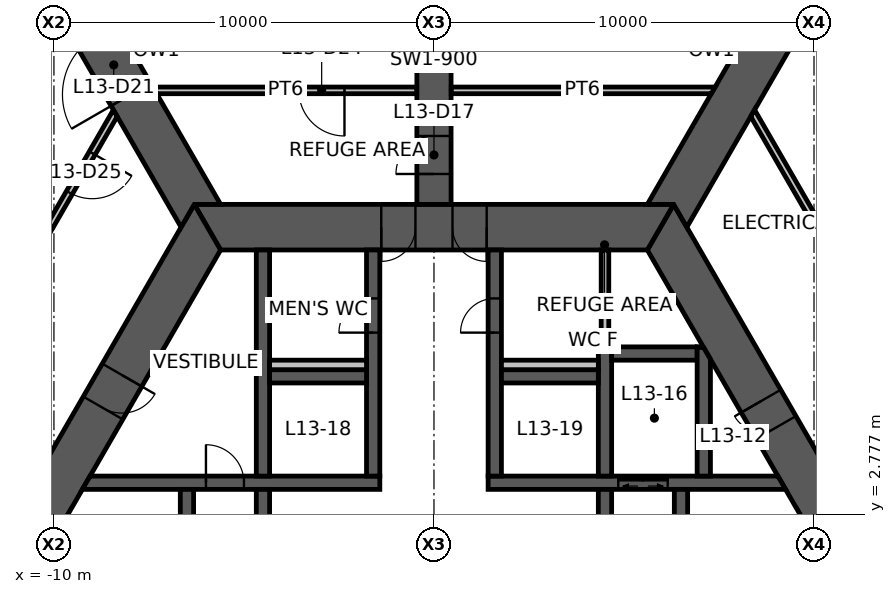
"""IFC4 building model, lengths in metres.
Left out: names, types, materials, properties, quantities, classifications, styles, units other than length and angle.
Written with IfcOpenShell. Run it as: python <this file> out.ifc"""

import sys

from ifc_helpers import new_model, si_unit, direction, frame, frame_2d, origin, place, context, subcontext, project, spatial, polyline, rectangle, outline, extrude, element, fill, save


model = new_model("IFC4")
c1 = context("Model", 3, precision=1e-05, world=origin(), true_north=direction((0.0, 1.0)))
c2 = subcontext(c1, "Body", "Model", "MODEL_VIEW")
j1 = project(units=[si_unit("LENGTHUNIT", "METRE"), si_unit("PLANEANGLEUNIT", "RADIAN")], contexts=[c1])
p1 = place(None, origin())
s1 = spatial("IfcSite", under=j1, at=p1, CompositionType="ELEMENT")
p2 = place(p1, origin())
s2 = spatial("IfcBuilding", under=s1, at=p2, CompositionType="ELEMENT")
p3 = place(p2, frame((0.0, 0.0, 52.0)))
s3 = spatial("IfcBuildingStorey", under=s2, at=p3, CompositionType="ELEMENT", Elevation=52.0)
p4 = place(p3, frame((11.922, 0.0, 0.0), z_axis=(0.0, 0.0, 1.0), x_axis=(-0.500004296715, 0.866022923061, 0.0)))
e1 = element("IfcWall", 1, at=p4, inside=s3, PredefinedType="SHEAR", context=c2, shape_type="SweptSolid", body=[
    extrude(outline(polyline([(-0.346, -0.6), (5.835, -0.6), (6.635, -0.6), (12.269, -0.6), (11.576, 0.6), (6.635, 0.6), (5.835, 0.6), (0.346, 0.6), (-0.346, -0.6)])), origin(), (0.0, 0.0, 1.0), 5.0),
])
p5 = place(p4, frame((5.835, 0.0, 0.0)))
e2 = element("IfcOpeningElement", 2, at=p5, cuts=e1, PredefinedType="OPENING", context=c2, shape_type="SweptSolid", body=[
    extrude(rectangle(XDim=0.8, YDim=2.1, at=frame_2d((0.4, 1.05))), frame((0.0, 0.61, 0.0), z_axis=(0.0, -1.0, 0.0), x_axis=(1.0, 0.0, 0.0)), (0.0, 0.0, 1.0), 1.22),
])
p6 = place(p3, frame((5.961, 10.325, 0.0), z_axis=(0.0, 0.0, 1.0), x_axis=(-1.0, 0.0, 0.0)))
e3 = element("IfcWall", 3, at=p6, inside=s3, PredefinedType="SHEAR", context=c2, shape_type="SweptSolid", body=[
    extrude(outline(polyline([(-0.346, -0.6), (4.574, -0.6), (5.474, -0.6), (6.449, -0.6), (7.349, -0.6), (12.269, -0.6), (11.576, 0.6), (7.349, 0.6), (6.449, 0.6), (5.474, 0.6), (4.574, 0.6), (0.346, 0.6), (-0.346, -0.6)])), origin(), (0.0, 0.0, 1.0), 5.0),
])
p7 = place(p6, frame((6.449, 0.0, 0.0)))
e4 = element("IfcOpeningElement", 4, at=p7, cuts=e3, PredefinedType="OPENING", context=c2, shape_type="SweptSolid", body=[
    extrude(rectangle(XDim=0.9, YDim=2.1, at=frame_2d((0.45, 1.05))), frame((0.0, 0.61, 0.0), z_axis=(0.0, -1.0, 0.0), x_axis=(1.0, 0.0, 0.0)), (0.0, 0.0, 1.0), 1.22),
])
p8 = place(p6, frame((4.574, 0.0, 0.0)))
e5 = element("IfcOpeningElement", 5, at=p8, cuts=e3, PredefinedType="OPENING", context=c2, shape_type="SweptSolid", body=[
    extrude(rectangle(XDim=0.9, YDim=2.1, at=frame_2d((0.45, 1.05))), frame((0.0, 0.61, 0.0), z_axis=(0.0, -1.0, 0.0), x_axis=(1.0, 0.0, 0.0)), (0.0, 0.0, 1.0), 1.22),
])
p9 = place(p3, frame((-5.961, 10.325, 0.0), z_axis=(0.0, 0.0, 1.0), x_axis=(-0.500004296715, -0.866022923061, 0.0)))
e6 = element("IfcWall", 6, at=p9, inside=s3, PredefinedType="SHEAR", context=c2, shape_type="SweptSolid", body=[
    extrude(outline(polyline([(-0.346, -0.6), (4.494, -0.6), (5.494, -0.6), (12.269, -0.6), (11.576, 0.6), (5.494, 0.6), (4.494, 0.6), (0.346, 0.6), (-0.346, -0.6)])), origin(), (0.0, 0.0, 1.0), 5.0),
])
p10 = place(p9, frame((4.494, 0.0, 0.0)))
e7 = element("IfcOpeningElement", 7, at=p10, cuts=e6, PredefinedType="OPENING", context=c2, shape_type="SweptSolid", body=[
    extrude(rectangle(XDim=1.0, YDim=2.1, at=frame_2d((0.5, 1.05))), frame((0.0, 0.61, 0.0), z_axis=(0.0, -1.0, 0.0), x_axis=(1.0, 0.0, 0.0)), (0.0, 0.0, 1.0), 1.22),
])
p11 = place(p3, frame((0.0, 10.925, 0.0), z_axis=(0.0, 0.0, 1.0), x_axis=(0.0, 1.0, 0.0)))
e8 = element("IfcWall", 8, at=p11, inside=s3, PredefinedType="SHEAR", context=c2, shape_type="SweptSolid", body=[
    extrude(rectangle(XDim=7.595, YDim=0.9, at=frame_2d((3.798, 0.0))), origin(), (0.0, 0.0, 1.0), 5.0),
])
p12 = place(p11, frame((0.8, 0.0, 0.0)))
e9 = element("IfcOpeningElement", 9, at=p12, cuts=e8, PredefinedType="OPENING", context=c2, shape_type="SweptSolid", body=[
    extrude(rectangle(XDim=1.0, YDim=2.1, at=frame_2d((0.5, 1.05))), frame((0.0, 0.46, 0.0), z_axis=(0.0, -1.0, 0.0), x_axis=(1.0, 0.0, 0.0)), (0.0, 0.0, 1.0), 0.92),
])
p13 = place(p3, frame((6.308, 10.925, -1.15), z_axis=(0.0, 0.0, 1.0), x_axis=(0.499993363642, 0.866029235253, 0.0)))
e10 = element("IfcWall", 10, at=p13, inside=s3, PredefinedType="SHEAR", context=c2, shape_type="SweptSolid", body=[
    extrude(outline(polyline([(-0.346, -0.6), (7.385, -0.6), (7.385, 0.6), (-0.346, 0.6), (0.0, 0.0), (-0.346, -0.6)])), origin(), (0.0, 0.0, 1.0), 6.15),
])
p14 = place(p3, frame((-6.308, 10.925, -1.15), z_axis=(0.0, 0.0, 1.0), x_axis=(-0.499993363642, 0.866029235253, 0.0)))
e11 = element("IfcWall", 11, at=p14, inside=s3, PredefinedType="SHEAR", context=c2, shape_type="SweptSolid", body=[
    extrude(outline(polyline([(-0.346, -0.6), (3.338, -0.6), (5.138, -0.6), (7.385, -0.6), (7.385, 0.6), (5.138, 0.6), (3.338, 0.6), (-0.346, 0.6), (0.0, 0.0), (-0.346, -0.6)])), origin(), (0.0, 0.0, 1.0), 6.15),
])
p15 = place(p14, frame((3.338, 0.0, 1.15)))
e12 = element("IfcOpeningElement", 12, at=p15, cuts=e11, PredefinedType="OPENING", context=c2, shape_type="SweptSolid", body=[
    extrude(rectangle(XDim=1.8, YDim=2.4, at=frame_2d((0.9, 1.2))), frame((0.0, 0.61, 0.0), z_axis=(0.0, -1.0, 0.0), x_axis=(1.0, 0.0, 0.0)), (0.0, 0.0, 1.0), 1.22),
])
p16 = place(p3, frame((-9.151, 3.6, 0.0), z_axis=(0.0, 0.0, 1.0), x_axis=(1.0, 0.0, 0.0)))
e13 = element("IfcWall", 13, at=p16, inside=s3, PredefinedType="SHEAR", context=c2, shape_type="SweptSolid", body=[
    extrude(outline(polyline([(-0.101, -0.175), (3.151, -0.175), (4.151, -0.175), (7.726, -0.175), (7.726, 0.175), (4.151, 0.175), (3.151, 0.175), (0.101, 0.175), (-0.101, -0.175)])), origin(), (0.0, 0.0, 1.0), 5.0),
])
p17 = place(p16, frame((3.151, 0.0, 0.0)))
e14 = element("IfcOpeningElement", 14, at=p17, cuts=e13, PredefinedType="OPENING", context=c2, shape_type="SweptSolid", body=[
    extrude(rectangle(XDim=1.0, YDim=2.1, at=frame_2d((0.5, 1.05))), frame((0.0, 0.185, 0.0), z_axis=(0.0, -1.0, 0.0), x_axis=(1.0, 0.0, 0.0)), (0.0, 0.0, 1.0), 0.37),
])
p18 = place(p3, frame((1.425, 3.6, 0.0), z_axis=(0.0, 0.0, 1.0), x_axis=(1.0, 0.0, 0.0)))
e15 = element("IfcWall", 15, at=p18, inside=s3, PredefinedType="SHEAR", context=c2, shape_type="SweptSolid", body=[
    extrude(outline(polyline([(0.0, -0.175), (3.425, -0.175), (4.725, -0.175), (7.827, -0.175), (7.625, 0.175), (4.725, 0.175), (3.425, 0.175), (0.0, 0.175), (0.0, -0.175)])), origin(), (0.0, 0.0, 1.0), 5.0),
])
p19 = place(p18, frame((3.425, 0.0, 0.0)))
e16 = element("IfcOpeningElement", 16, at=p19, cuts=e15, PredefinedType="OPENING", context=c2, shape_type="SweptSolid", body=[
    extrude(rectangle(XDim=1.3, YDim=2.1, at=frame_2d((0.65, 1.05))), frame((0.0, 0.185, 0.0), z_axis=(0.0, -1.0, 0.0), x_axis=(1.0, 0.0, 0.0)), (0.0, 0.0, 1.0), 0.37),
])
p20 = place(p3, frame((-1.6, 3.775, 0.0), z_axis=(0.0, 0.0, 1.0), x_axis=(0.0, 1.0, 0.0)))
e17 = element("IfcWall", 17, at=p20, inside=s3, PredefinedType="SHEAR", context=c2, shape_type="SweptSolid", body=[
    extrude(rectangle(XDim=5.95, YDim=0.35, at=frame_2d((2.975, 0.0))), origin(), (0.0, 0.0, 1.0), 5.0),
])
p21 = place(p20, frame((3.775, 0.0, 0.0)))
e18 = element("IfcOpeningElement", 18, at=p21, cuts=e17, PredefinedType="OPENING", context=c2, shape_type="SweptSolid", body=[
    extrude(rectangle(XDim=0.9, YDim=2.1, at=frame_2d((0.45, 1.05))), frame((0.0, 0.185, 0.0), z_axis=(0.0, -1.0, 0.0), x_axis=(1.0, 0.0, 0.0)), (0.0, 0.0, 1.0), 0.37),
])
p22 = place(p3, frame((1.6, 3.775, 0.0), z_axis=(0.0, 0.0, 1.0), x_axis=(0.0, 1.0, 0.0)))
e19 = element("IfcWall", 19, at=p22, inside=s3, PredefinedType="SHEAR", context=c2, shape_type="SweptSolid", body=[
    extrude(rectangle(XDim=5.95, YDim=0.35, at=frame_2d((2.975, 0.0))), origin(), (0.0, 0.0, 1.0), 5.0),
])
p23 = place(p22, frame((3.775, 0.0, 0.0)))
e20 = element("IfcOpeningElement", 20, at=p23, cuts=e19, PredefinedType="OPENING", context=c2, shape_type="SweptSolid", body=[
    extrude(rectangle(XDim=0.9, YDim=2.1, at=frame_2d((0.45, 1.05))), frame((0.0, 0.185, 0.0), z_axis=(0.0, -1.0, 0.0), x_axis=(1.0, 0.0, 0.0)), (0.0, 0.0, 1.0), 0.37),
])
p24 = place(p3, frame((-4.5, -3.425, 0.0), z_axis=(0.0, 0.0, 1.0), x_axis=(0.0, 1.0, 0.0)))
e21 = element("IfcWall", 21, at=p24, inside=s3, PredefinedType="SHEAR", context=c2, shape_type="SweptSolid", body=[
    extrude(rectangle(XDim=6.85, YDim=0.35, at=frame_2d((3.425, 0.0))), origin(), (0.0, 0.0, 1.0), 5.0),
])
p25 = place(p24, frame((2.925, 0.0, 0.0)))
e22 = element("IfcOpeningElement", 22, at=p25, cuts=e21, PredefinedType="OPENING", context=c2, shape_type="SweptSolid", body=[
    extrude(rectangle(XDim=1.0, YDim=2.1, at=frame_2d((0.5, 1.05))), frame((0.0, 0.185, 0.0), z_axis=(0.0, -1.0, 0.0), x_axis=(1.0, 0.0, 0.0)), (0.0, 0.0, 1.0), 0.37),
])
p26 = place(p3, frame((4.5, -3.425, 0.0), z_axis=(0.0, 0.0, 1.0), x_axis=(0.0, 1.0, 0.0)))
e23 = element("IfcWall", 23, at=p26, inside=s3, PredefinedType="SHEAR", context=c2, shape_type="SweptSolid", body=[
    extrude(rectangle(XDim=6.85, YDim=0.35, at=frame_2d((3.425, 0.0))), origin(), (0.0, 0.0, 1.0), 5.0),
])
p27 = place(p26, frame((2.925, 0.0, 0.0)))
e24 = element("IfcOpeningElement", 24, at=p27, cuts=e23, PredefinedType="OPENING", context=c2, shape_type="SweptSolid", body=[
    extrude(rectangle(XDim=1.0, YDim=2.1, at=frame_2d((0.5, 1.05))), frame((0.0, 0.185, 0.0), z_axis=(0.0, -1.0, 0.0), x_axis=(1.0, 0.0, 0.0)), (0.0, 0.0, 1.0), 0.37),
])
p28 = place(p3, frame((-6.5, -3.425, 0.0), z_axis=(0.0, 0.0, 1.0), x_axis=(0.0, 1.0, 0.0)))
e25 = element("IfcWall", 25, at=p28, inside=s3, PredefinedType="SHEAR", context=c2, shape_type="SweptSolid", body=[
    extrude(rectangle(XDim=6.85, YDim=0.35, at=frame_2d((3.425, 0.0))), origin(), (0.0, 0.0, 1.0), 5.0),
])
p29 = place(p28, frame((0.1, 0.0, 0.0)))
e26 = element("IfcOpeningElement", 26, at=p29, cuts=e25, PredefinedType="OPENING", context=c2, shape_type="SweptSolid", body=[
    extrude(rectangle(XDim=1.0, YDim=2.1, at=frame_2d((0.5, 1.05))), frame((0.0, 0.185, 0.0), z_axis=(0.0, -1.0, 0.0), x_axis=(1.0, 0.0, 0.0)), (0.0, 0.0, 1.0), 0.37),
])
p30 = place(p3, frame((6.5, -3.425, 0.0), z_axis=(0.0, 0.0, 1.0), x_axis=(0.0, 1.0, 0.0)))
e27 = element("IfcWall", 27, at=p30, inside=s3, PredefinedType="SHEAR", context=c2, shape_type="SweptSolid", body=[
    extrude(rectangle(XDim=6.85, YDim=0.35, at=frame_2d((3.425, 0.0))), origin(), (0.0, 0.0, 1.0), 5.0),
])
p31 = place(p30, frame((0.1, 0.0, 0.0)))
e28 = element("IfcOpeningElement", 28, at=p31, cuts=e27, PredefinedType="OPENING", context=c2, shape_type="SweptSolid", body=[
    extrude(rectangle(XDim=1.0, YDim=2.1, at=frame_2d((0.5, 1.05))), frame((0.0, 0.185, 0.0), z_axis=(0.0, -1.0, 0.0), x_axis=(1.0, 0.0, 0.0)), (0.0, 0.0, 1.0), 0.37),
])
p32 = place(p3, frame((-4.5, 3.775, 0.0), z_axis=(0.0, 0.0, 1.0), x_axis=(0.0, 1.0, 0.0)))
e29 = element("IfcWall", 29, at=p32, inside=s3, PredefinedType="SHEAR", context=c2, shape_type="SweptSolid", body=[
    extrude(rectangle(XDim=5.95, YDim=0.35, at=frame_2d((2.975, 0.0))), origin(), (0.0, 0.0, 1.0), 5.0),
])
p33 = place(p3, frame((4.5, 3.775, 0.0), z_axis=(0.0, 0.0, 1.0), x_axis=(0.0, 1.0, 0.0)))
e30 = element("IfcWall", 30, at=p33, inside=s3, PredefinedType="SHEAR", context=c2, shape_type="SweptSolid", body=[
    extrude(rectangle(XDim=3.4, YDim=0.35, at=frame_2d((1.7, 0.0))), origin(), (0.0, 0.0, 1.0), 5.0),
])
for number, where, z_axis, x_axis in (
    (31, (-4.325, 6.4, 0.0), (0.0, 0.0, 1.0), (1.0, 0.0, 0.0)),
    (32, (1.775, 6.4, 0.0), (0.0, 0.0, 1.0), (1.0, 0.0, 0.0)),
):
    element("IfcWall", number, at=place(p3, frame(where, z_axis=z_axis, x_axis=x_axis)), inside=s3, PredefinedType="SHEAR", context=c2, shape_type="SweptSolid", body=[
        extrude(rectangle(XDim=2.55, YDim=0.35, at=frame_2d((1.275, 0.0))), origin(), (0.0, 0.0, 1.0), 5.0),
    ])
p34 = place(p3, frame((4.675, 7.0, 0.0), z_axis=(0.0, 0.0, 1.0), x_axis=(1.0, 0.0, 0.0)))
e33 = element("IfcWall", 33, at=p34, inside=s3, PredefinedType="SHEAR", context=c2, shape_type="SweptSolid", body=[
    extrude(rectangle(XDim=2.25, YDim=0.35, at=frame_2d((1.125, 0.0))), origin(), (0.0, 0.0, 1.0), 5.0),
])
p35 = place(p3, frame((7.1, 3.775, 0.0), z_axis=(0.0, 0.0, 1.0), x_axis=(0.0, 1.0, 0.0)))
e34 = element("IfcWall", 34, at=p35, inside=s3, PredefinedType="SHEAR", context=c2, shape_type="SweptSolid", body=[
    extrude(outline(polyline([(0.0, -0.175), (3.074, -0.175), (3.377, 0.0), (3.4, 0.175), (0.0, 0.175), (0.0, -0.175)])), origin(), (0.0, 0.0, 1.0), 5.0),
])
p36 = place(p3, frame((4.5, 7.175, 0.0), z_axis=(0.0, 0.0, 1.0), x_axis=(0.0, 1.0, 0.0)))
e35 = element("IfcWall", 35, at=p36, inside=s3, PredefinedType="STANDARD", context=c2, shape_type="SweptSolid", body=[
    extrude(rectangle(XDim=2.55, YDim=0.2, at=frame_2d((1.275, 0.0))), origin(), (0.0, 0.0, 1.0), 5.0),
])
for number, where, z_axis, x_axis in (
    (36, (-4.325, 6.7, 0.0), (0.0, 0.0, 1.0), (1.0, 0.0, 0.0)),
    (37, (1.775, 6.7, 0.0), (0.0, 0.0, 1.0), (1.0, 0.0, 0.0)),
):
    element("IfcWall", number, at=place(p3, frame(where, z_axis=z_axis, x_axis=x_axis)), inside=s3, PredefinedType="PLUMBINGWALL", context=c2, shape_type="SweptSolid", body=[
        extrude(rectangle(XDim=2.55, YDim=0.25, at=frame_2d((1.275, 0.0))), origin(), (0.0, 0.0, 1.0), 5.0),
    ])
p37 = place(p3, frame((15.733, 0.6, 0.0), z_axis=(0.0, 0.0, 1.0), x_axis=(-0.49999908555, 0.866025931742, 0.0)))
e38 = element("IfcWall", 38, at=p37, inside=s3, PredefinedType="PARTITIONING", context=c2, shape_type="SweptSolid", body=[
    extrude(outline(polyline([(-0.051, -0.087), (1.213, -0.087), (2.413, -0.087), (14.744, -0.087), (14.643, 0.087), (2.413, 0.087), (1.213, 0.087), (0.051, 0.087), (-0.051, -0.087)])), origin(), (0.0, 0.0, 1.0), 4.83),
])
p38 = place(p37, frame((1.213, 0.0, 0.0)))
e39 = element("IfcOpeningElement", 39, at=p38, cuts=e38, PredefinedType="OPENING", context=c2, shape_type="SweptSolid", body=[
    extrude(rectangle(XDim=1.2, YDim=2.1, at=frame_2d((0.6, 1.05))), frame((0.0, 0.098, 0.0), z_axis=(0.0, -1.0, 0.0), x_axis=(1.0, 0.0, 0.0)), (0.0, 0.0, 1.0), 0.195),
])
p39 = place(p3, frame((7.347, 13.925, 0.0), z_axis=(0.0, 0.0, 1.0), x_axis=(-1.0, 0.0, 0.0)))
e40 = element("IfcWall", 40, at=p39, inside=s3, PredefinedType="PARTITIONING", context=c2, shape_type="SweptSolid", body=[
    extrude(outline(polyline([(-0.051, -0.087), (6.892, -0.087), (6.892, 0.087), (0.051, 0.087), (-0.051, -0.087)])), origin(), (0.0, 0.0, 1.0), 4.83),
])
p40 = place(p3, frame((-0.455, 13.925, 0.0), z_axis=(0.0, 0.0, 1.0), x_axis=(-1.0, 0.0, 0.0)))
e41 = element("IfcWall", 41, at=p40, inside=s3, PredefinedType="PARTITIONING", context=c2, shape_type="SweptSolid", body=[
    extrude(outline(polyline([(0.0, -0.087), (1.9, -0.087), (3.1, -0.087), (6.942, -0.087), (6.841, 0.087), (3.1, 0.087), (1.9, 0.087), (0.0, 0.087), (0.0, -0.087)])), origin(), (0.0, 0.0, 1.0), 4.83),
])
p41 = place(p40, frame((1.9, 0.0, 0.0)))
e42 = element("IfcOpeningElement", 42, at=p41, cuts=e41, PredefinedType="OPENING", context=c2, shape_type="SweptSolid", body=[
    extrude(rectangle(XDim=1.2, YDim=2.1, at=frame_2d((0.6, 1.05))), frame((0.0, 0.098, 0.0), z_axis=(0.0, -1.0, 0.0), x_axis=(1.0, 0.0, 0.0)), (0.0, 0.0, 1.0), 0.195),
])
p42 = place(p3, frame((-8.386, 13.325, 0.0), z_axis=(0.0, 0.0, 1.0), x_axis=(-0.500011547171, -0.866018736919, 0.0)))
e43 = element("IfcWall", 43, at=p42, inside=s3, PredefinedType="PARTITIONING", context=c2, shape_type="SweptSolid", body=[
    extrude(outline(polyline([(-0.051, -0.087), (1.213, -0.087), (2.413, -0.087), (14.744, -0.087), (14.643, 0.087), (2.413, 0.087), (1.213, 0.087), (0.051, 0.087), (-0.051, -0.087)])), origin(), (0.0, 0.0, 1.0), 4.83),
])
p43 = place(p42, frame((1.213, 0.0, 0.0)))
e44 = element("IfcOpeningElement", 44, at=p43, cuts=e43, PredefinedType="OPENING", context=c2, shape_type="SweptSolid", body=[
    extrude(rectangle(XDim=1.2, YDim=2.1, at=frame_2d((0.6, 1.05))), frame((0.0, 0.098, 0.0), z_axis=(0.0, -1.0, 0.0), x_axis=(1.0, 0.0, 0.0)), (0.0, 0.0, 1.0), 0.195),
])
p44 = place(p7, origin())
e45 = element("IfcDoor", 45, at=p44, inside=s3, OperationType="SINGLE_SWING_RIGHT", PredefinedType="DOOR", context=c2, shape_type="SweptSolid", body=[
    extrude(rectangle(XDim=0.9, YDim=2.1, at=frame_2d((0.45, 1.05))), frame((0.0, 0.025, 0.0), z_axis=(0.0, -1.0, 0.0), x_axis=(1.0, 0.0, 0.0)), (0.0, 0.0, 1.0), 0.05),
])
fill(e4, e45)
p45 = place(p8, origin())
e46 = element("IfcDoor", 46, at=p45, inside=s3, OperationType="SINGLE_SWING_LEFT", PredefinedType="DOOR", context=c2, shape_type="SweptSolid", body=[
    extrude(rectangle(XDim=0.9, YDim=2.1, at=frame_2d((0.45, 1.05))), frame((0.0, 0.025, 0.0), z_axis=(0.0, -1.0, 0.0), x_axis=(1.0, 0.0, 0.0)), (0.0, 0.0, 1.0), 0.05),
])
fill(e5, e46)
p46 = place(p5, origin())
e47 = element("IfcDoor", 47, at=p46, inside=s3, OperationType="SINGLE_SWING_RIGHT", PredefinedType="DOOR", context=c2, shape_type="SweptSolid", body=[
    extrude(rectangle(XDim=0.8, YDim=2.1, at=frame_2d((0.4, 1.05))), frame((0.0, 0.025, 0.0), z_axis=(0.0, -1.0, 0.0), x_axis=(1.0, 0.0, 0.0)), (0.0, 0.0, 1.0), 0.05),
])
fill(e2, e47)
p47 = place(p10, origin())
e48 = element("IfcDoor", 48, at=p47, inside=s3, OperationType="SINGLE_SWING_LEFT", PredefinedType="DOOR", context=c2, shape_type="SweptSolid", body=[
    extrude(rectangle(XDim=1.0, YDim=2.1, at=frame_2d((0.5, 1.05))), frame((0.0, 0.025, 0.0), z_axis=(0.0, -1.0, 0.0), x_axis=(1.0, 0.0, 0.0)), (0.0, 0.0, 1.0), 0.05),
])
fill(e7, e48)
p48 = place(p17, origin())
e49 = element("IfcDoor", 49, at=p48, inside=s3, OperationType="SINGLE_SWING_LEFT", PredefinedType="DOOR", context=c2, shape_type="SweptSolid", body=[
    extrude(rectangle(XDim=1.0, YDim=2.1, at=frame_2d((0.5, 1.05))), frame((0.0, 0.025, 0.0), z_axis=(0.0, -1.0, 0.0), x_axis=(1.0, 0.0, 0.0)), (0.0, 0.0, 1.0), 0.05),
])
fill(e14, e49)
p49 = place(p21, origin())
e50 = element("IfcDoor", 50, at=p49, inside=s3, OperationType="SINGLE_SWING_LEFT", PredefinedType="DOOR", context=c2, shape_type="SweptSolid", body=[
    extrude(rectangle(XDim=0.9, YDim=2.1, at=frame_2d((0.45, 1.05))), frame((0.0, 0.025, 0.0), z_axis=(0.0, -1.0, 0.0), x_axis=(1.0, 0.0, 0.0)), (0.0, 0.0, 1.0), 0.05),
])
fill(e18, e50)
p50 = place(p23, origin())
e51 = element("IfcDoor", 51, at=p50, inside=s3, OperationType="SINGLE_SWING_LEFT", PredefinedType="DOOR", context=c2, shape_type="SweptSolid", body=[
    extrude(rectangle(XDim=0.9, YDim=2.1, at=frame_2d((0.45, 1.05))), frame((0.0, 0.025, 0.0), z_axis=(0.0, -1.0, 0.0), x_axis=(1.0, 0.0, 0.0)), (0.0, 0.0, 1.0), 0.05),
])
fill(e20, e51)
p51 = place(p12, origin())
e52 = element("IfcDoor", 52, at=p51, inside=s3, OperationType="SINGLE_SWING_LEFT", PredefinedType="DOOR", context=c2, shape_type="SweptSolid", body=[
    extrude(rectangle(XDim=1.0, YDim=2.1, at=frame_2d((0.5, 1.05))), frame((0.0, 0.025, 0.0), z_axis=(0.0, -1.0, 0.0), x_axis=(1.0, 0.0, 0.0)), (0.0, 0.0, 1.0), 0.05),
])
fill(e9, e52)
p52 = place(p15, origin())
e53 = element("IfcDoor", 53, at=p52, inside=s3, OperationType="DOUBLE_DOOR_SINGLE_SWING", PredefinedType="DOOR", context=c2, shape_type="SweptSolid", body=[
    extrude(rectangle(XDim=1.8, YDim=2.4, at=frame_2d((0.9, 1.2))), frame((0.0, 0.025, 0.0), z_axis=(0.0, -1.0, 0.0), x_axis=(1.0, 0.0, 0.0)), (0.0, 0.0, 1.0), 0.05),
])
fill(e12, e53)
p53 = place(p41, origin())
e54 = element("IfcDoor", 54, at=p53, inside=s3, OperationType="DOUBLE_DOOR_SINGLE_SWING", PredefinedType="DOOR", context=c2, shape_type="SweptSolid", body=[
    extrude(rectangle(XDim=1.2, YDim=2.1, at=frame_2d((0.6, 1.05))), frame((0.0, 0.025, 0.0), z_axis=(0.0, -1.0, 0.0), x_axis=(1.0, 0.0, 0.0)), (0.0, 0.0, 1.0), 0.05),
])
fill(e42, e54)
p54 = place(p43, origin())
e55 = element("IfcDoor", 55, at=p54, inside=s3, OperationType="DOUBLE_DOOR_SINGLE_SWING", PredefinedType="DOOR", context=c2, shape_type="SweptSolid", body=[
    extrude(rectangle(XDim=1.2, YDim=2.1, at=frame_2d((0.6, 1.05))), frame((0.0, 0.025, 0.0), z_axis=(0.0, -1.0, 0.0), x_axis=(1.0, 0.0, 0.0)), (0.0, 0.0, 1.0), 0.05),
])
fill(e44, e55)
p55 = place(p19, origin())
e56 = element("IfcDoor", 56, at=p55, inside=s3, OperationType="DOUBLE_DOOR_SLIDING", PredefinedType="DOOR", context=c2, shape_type="SweptSolid", body=[
    extrude(rectangle(XDim=1.3, YDim=2.1, at=frame_2d((0.65, 1.05))), frame((0.0, 0.025, 0.0), z_axis=(0.0, -1.0, 0.0), x_axis=(1.0, 0.0, 0.0)), (0.0, 0.0, 1.0), 0.05),
])
fill(e16, e56)
save(model, sys.argv[1])
